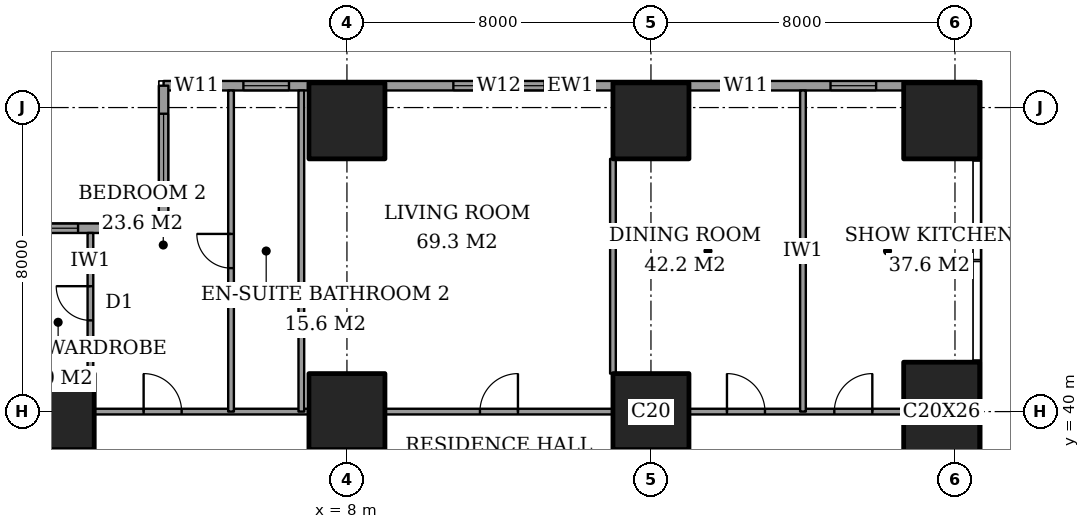
"""IFC4 building model, lengths in metres.
Left out: names, types, materials, properties, quantities, classifications, styles, units other than length and angle.
Written with IfcOpenShell. Run it as: python <this file> out.ifc"""

import sys

from ifc_helpers import new_model, si_unit, direction, frame, frame_2d, origin, origin_2d, place, context, subcontext, project, spatial, rectangle, extrude, element, fill, save


model = new_model("IFC4")
c1 = context("Model", 3, precision=1e-05, world=origin(), true_north=direction((0.0, 1.0)))
c2 = subcontext(c1, "Body", "Model", "MODEL_VIEW")
j1 = project(units=[si_unit("LENGTHUNIT", "METRE"), si_unit("PLANEANGLEUNIT", "RADIAN")], contexts=[c1])
p1 = place(None, origin())
s1 = spatial("IfcSite", under=j1, at=p1, CompositionType="ELEMENT")
p2 = place(p1, origin())
s2 = spatial("IfcBuilding", under=s1, at=p2, CompositionType="ELEMENT")
p3 = place(p2, frame((0.0, 0.0, 143.0)))
s3 = spatial("IfcBuildingStorey", under=s2, at=p3, CompositionType="ELEMENT", Elevation=143.0)
for number, where, z_axis, x_axis in (
    (1, (0.35, 40.0, 0.0), (0.0, 0.0, 1.0), (1.0, 0.0, 0.0)),
    (2, (8.0, 40.0, 0.0), (0.0, 0.0, 1.0), (1.0, 0.0, 0.0)),
    (3, (8.0, 47.65, 0.0), (0.0, 0.0, 1.0), (1.0, 0.0, 0.0)),
    (4, (16.0, 40.0, 0.0), (0.0, 0.0, 1.0), (1.0, 0.0, 0.0)),
    (5, (16.0, 47.65, 0.0), (0.0, 0.0, 1.0), (1.0, 0.0, 0.0)),
):
    element("IfcColumn", number, at=place(p3, frame(where, z_axis=z_axis, x_axis=x_axis)), inside=s3, PredefinedType="COLUMN", context=c2, shape_type="SweptSolid", body=[
        extrude(rectangle(XDim=2.0, YDim=2.0, at=origin_2d()), origin(), (0.0, 0.0, 1.0), 3.6),
    ])
p4 = place(p3, frame((23.65, 40.0, 0.0), z_axis=(0.0, 0.0, 1.0), x_axis=(1.0, 0.0, 0.0)))
e6 = element("IfcColumn", 6, at=p4, inside=s3, PredefinedType="COLUMN", context=c2, shape_type="SweptSolid", body=[
    extrude(rectangle(XDim=2.0, YDim=2.6, at=origin_2d()), origin(), (0.0, 0.0, 1.0), 3.6),
])
p5 = place(p3, frame((23.65, 47.65, 0.0), z_axis=(0.0, 0.0, 1.0), x_axis=(1.0, 0.0, 0.0)))
e7 = element("IfcColumn", 7, at=p5, inside=s3, PredefinedType="COLUMN", context=c2, shape_type="SweptSolid", body=[
    extrude(rectangle(XDim=2.0, YDim=2.0, at=origin_2d()), origin(), (0.0, 0.0, 1.0), 3.6),
])
p6 = place(p3, frame((24.575, 48.575, 0.0), z_axis=(0.0, 0.0, 1.0), x_axis=(-1.0, 0.0, 0.0)))
e8 = element("IfcWall", 8, at=p6, inside=s3, PredefinedType="SOLIDWALL", context=c2, shape_type="SweptSolid", body=[
    extrude(rectangle(XDim=21.4, YDim=0.25, at=frame_2d((10.7, 0.0))), origin(), (0.0, 0.0, 1.0), 3.6),
])
p7 = place(p6, frame((2.65, 0.0, 0.4)))
e9 = element("IfcOpeningElement", 9, at=p7, cuts=e8, PredefinedType="OPENING", context=c2, shape_type="SweptSolid", body=[
    extrude(rectangle(XDim=1.2, YDim=2.2, at=frame_2d((0.6, 1.1))), frame((0.0, 0.135, 0.0), z_axis=(0.0, -1.0, 0.0), x_axis=(1.0, 0.0, 0.0)), (0.0, 0.0, 1.0), 0.27),
])
p8 = place(p6, frame((5.475, 0.0, 0.4)))
e10 = element("IfcOpeningElement", 10, at=p8, cuts=e8, PredefinedType="OPENING", context=c2, shape_type="SweptSolid", body=[
    extrude(rectangle(XDim=1.2, YDim=2.2, at=frame_2d((0.6, 1.1))), frame((0.0, 0.135, 0.0), z_axis=(0.0, -1.0, 0.0), x_axis=(1.0, 0.0, 0.0)), (0.0, 0.0, 1.0), 0.27),
])
p9 = place(p6, frame((11.375, 0.0, 0.4)))
e11 = element("IfcOpeningElement", 11, at=p9, cuts=e8, PredefinedType="OPENING", context=c2, shape_type="SweptSolid", body=[
    extrude(rectangle(XDim=2.4, YDim=2.2, at=frame_2d((1.2, 1.1))), frame((0.0, 0.135, 0.0), z_axis=(0.0, -1.0, 0.0), x_axis=(1.0, 0.0, 0.0)), (0.0, 0.0, 1.0), 0.27),
])
p10 = place(p6, frame((18.1, 0.0, 0.4)))
e12 = element("IfcOpeningElement", 12, at=p10, cuts=e8, PredefinedType="OPENING", context=c2, shape_type="SweptSolid", body=[
    extrude(rectangle(XDim=1.2, YDim=2.2, at=frame_2d((0.6, 1.1))), frame((0.0, 0.135, 0.0), z_axis=(0.0, -1.0, 0.0), x_axis=(1.0, 0.0, 0.0)), (0.0, 0.0, 1.0), 0.27),
])
p11 = place(p6, frame((19.925, 0.0, 0.4)))
e13 = element("IfcOpeningElement", 13, at=p11, cuts=e8, PredefinedType="OPENING", context=c2, shape_type="SweptSolid", body=[
    extrude(rectangle(XDim=1.2, YDim=2.2, at=frame_2d((0.6, 1.1))), frame((0.0, 0.135, 0.0), z_axis=(0.0, -1.0, 0.0), x_axis=(1.0, 0.0, 0.0)), (0.0, 0.0, 1.0), 0.27),
])
p12 = place(p3, frame((3.175, 48.575, 0.0), z_axis=(0.0, 0.0, 1.0), x_axis=(0.0, -1.0, 0.0)))
e14 = element("IfcWall", 14, at=p12, inside=s3, PredefinedType="SOLIDWALL", context=c2, shape_type="SweptSolid", body=[
    extrude(rectangle(XDim=3.75, YDim=0.25, at=frame_2d((1.875, 0.0))), origin(), (0.0, 0.0, 1.0), 3.6),
])
p13 = place(p12, frame((0.738, 0.0, 0.4)))
e15 = element("IfcOpeningElement", 15, at=p13, cuts=e14, PredefinedType="OPENING", context=c2, shape_type="SweptSolid", body=[
    extrude(rectangle(XDim=2.4, YDim=2.2, at=frame_2d((1.2, 1.1))), frame((0.0, 0.135, 0.0), z_axis=(0.0, -1.0, 0.0), x_axis=(1.0, 0.0, 0.0)), (0.0, 0.0, 1.0), 0.27),
])
p14 = place(p3, frame((3.175, 44.825, 0.0), z_axis=(0.0, 0.0, 1.0), x_axis=(-1.0, 0.0, 0.0)))
e16 = element("IfcWall", 16, at=p14, inside=s3, PredefinedType="SOLIDWALL", context=c2, shape_type="SweptSolid", body=[
    extrude(rectangle(XDim=3.75, YDim=0.25, at=frame_2d((1.875, 0.0))), origin(), (0.0, 0.0, 1.0), 3.6),
])
p15 = place(p14, frame((0.363, 0.0, 0.4)))
e17 = element("IfcOpeningElement", 17, at=p15, cuts=e16, PredefinedType="OPENING", context=c2, shape_type="SweptSolid", body=[
    extrude(rectangle(XDim=1.2, YDim=2.2, at=frame_2d((0.6, 1.1))), frame((0.0, 0.135, 0.0), z_axis=(0.0, -1.0, 0.0), x_axis=(1.0, 0.0, 0.0)), (0.0, 0.0, 1.0), 0.27),
])
p16 = place(p14, frame((2.25, 0.0, 0.4)))
e18 = element("IfcOpeningElement", 18, at=p16, cuts=e16, PredefinedType="OPENING", context=c2, shape_type="SweptSolid", body=[
    extrude(rectangle(XDim=1.2, YDim=2.2, at=frame_2d((0.6, 1.1))), frame((0.0, 0.135, 0.0), z_axis=(0.0, -1.0, 0.0), x_axis=(1.0, 0.0, 0.0)), (0.0, 0.0, 1.0), 0.27),
])
p17 = place(p3, frame((1.35, 40.0, 0.0), z_axis=(0.0, 0.0, 1.0), x_axis=(1.0, 0.0, 0.0)))
e19 = element("IfcWall", 19, at=p17, inside=s3, PredefinedType="PARTITIONING", context=c2, shape_type="SweptSolid", body=[
    extrude(rectangle(XDim=5.65, YDim=0.15, at=frame_2d((2.825, 0.0))), origin(), (0.0, 0.0, 1.0), 3.35),
])
p18 = place(p17, frame((1.3, 0.0, 0.0)))
e20 = element("IfcOpeningElement", 20, at=p18, cuts=e19, PredefinedType="OPENING", context=c2, shape_type="SweptSolid", body=[
    extrude(rectangle(XDim=1.0, YDim=2.1, at=frame_2d((0.5, 1.05))), frame((0.0, 0.085, 0.0), z_axis=(0.0, -1.0, 0.0), x_axis=(1.0, 0.0, 0.0)), (0.0, 0.0, 1.0), 0.17),
])
p19 = place(p3, frame((9.0, 40.0, 0.0), z_axis=(0.0, 0.0, 1.0), x_axis=(1.0, 0.0, 0.0)))
e21 = element("IfcWall", 21, at=p19, inside=s3, PredefinedType="PARTITIONING", context=c2, shape_type="SweptSolid", body=[
    extrude(rectangle(XDim=6.0, YDim=0.15, at=frame_2d((3.0, 0.0))), origin(), (0.0, 0.0, 1.0), 3.35),
])
p20 = place(p19, frame((2.5, 0.0, 0.0)))
e22 = element("IfcOpeningElement", 22, at=p20, cuts=e21, PredefinedType="OPENING", context=c2, shape_type="SweptSolid", body=[
    extrude(rectangle(XDim=1.0, YDim=2.1, at=frame_2d((0.5, 1.05))), frame((0.0, 0.085, 0.0), z_axis=(0.0, -1.0, 0.0), x_axis=(1.0, 0.0, 0.0)), (0.0, 0.0, 1.0), 0.17),
])
p21 = place(p3, frame((17.0, 40.0, 0.0), z_axis=(0.0, 0.0, 1.0), x_axis=(1.0, 0.0, 0.0)))
e23 = element("IfcWall", 23, at=p21, inside=s3, PredefinedType="PARTITIONING", context=c2, shape_type="SweptSolid", body=[
    extrude(rectangle(XDim=5.65, YDim=0.15, at=frame_2d((2.825, 0.0))), origin(), (0.0, 0.0, 1.0), 3.35),
])
p22 = place(p21, frame((1.0, 0.0, 0.0)))
e24 = element("IfcOpeningElement", 24, at=p22, cuts=e23, PredefinedType="OPENING", context=c2, shape_type="SweptSolid", body=[
    extrude(rectangle(XDim=1.0, YDim=2.1, at=frame_2d((0.5, 1.05))), frame((0.0, 0.085, 0.0), z_axis=(0.0, -1.0, 0.0), x_axis=(1.0, 0.0, 0.0)), (0.0, 0.0, 1.0), 0.17),
])
p23 = place(p21, frame((3.825, 0.0, 0.0)))
e25 = element("IfcOpeningElement", 25, at=p23, cuts=e23, PredefinedType="OPENING", context=c2, shape_type="SweptSolid", body=[
    extrude(rectangle(XDim=1.0, YDim=2.1, at=frame_2d((0.5, 1.05))), frame((0.0, 0.085, 0.0), z_axis=(0.0, -1.0, 0.0), x_axis=(1.0, 0.0, 0.0)), (0.0, 0.0, 1.0), 0.17),
])
p24 = place(p3, frame((1.25, 41.0, 0.0), z_axis=(0.0, 0.0, 1.0), x_axis=(0.0, 1.0, 0.0)))
e26 = element("IfcWall", 26, at=p24, inside=s3, PredefinedType="PARTITIONING", context=c2, shape_type="SweptSolid", body=[
    extrude(rectangle(XDim=3.7, YDim=0.15, at=frame_2d((1.85, 0.0))), origin(), (0.0, 0.0, 1.0), 3.35),
])
p25 = place(p24, frame((1.4, 0.0, 0.0)))
e27 = element("IfcOpeningElement", 27, at=p25, cuts=e26, PredefinedType="OPENING", context=c2, shape_type="SweptSolid", body=[
    extrude(rectangle(XDim=0.9, YDim=2.1, at=frame_2d((0.45, 1.05))), frame((0.0, 0.085, 0.0), z_axis=(0.0, -1.0, 0.0), x_axis=(1.0, 0.0, 0.0)), (0.0, 0.0, 1.0), 0.17),
])
p26 = place(p3, frame((4.95, 40.0, 0.0), z_axis=(0.0, 0.0, 1.0), x_axis=(0.0, 1.0, 0.0)))
e28 = element("IfcWall", 28, at=p26, inside=s3, PredefinedType="PARTITIONING", context=c2, shape_type="SweptSolid", body=[
    extrude(rectangle(XDim=8.45, YDim=0.15, at=frame_2d((4.225, 0.0))), origin(), (0.0, 0.0, 1.0), 3.35),
])
p27 = place(p26, frame((3.775, 0.0, 0.0)))
e29 = element("IfcOpeningElement", 29, at=p27, cuts=e28, PredefinedType="OPENING", context=c2, shape_type="SweptSolid", body=[
    extrude(rectangle(XDim=0.9, YDim=2.1, at=frame_2d((0.45, 1.05))), frame((0.0, 0.085, 0.0), z_axis=(0.0, -1.0, 0.0), x_axis=(1.0, 0.0, 0.0)), (0.0, 0.0, 1.0), 0.17),
])
p28 = place(p3, frame((6.8, 40.0, 0.0), z_axis=(0.0, 0.0, 1.0), x_axis=(0.0, 1.0, 0.0)))
e30 = element("IfcWall", 30, at=p28, inside=s3, PredefinedType="PARTITIONING", context=c2, shape_type="SweptSolid", body=[
    extrude(rectangle(XDim=8.45, YDim=0.15, at=frame_2d((4.225, 0.0))), origin(), (0.0, 0.0, 1.0), 3.35),
])
p29 = place(p3, frame((15.0, 41.0, 0.0), z_axis=(0.0, 0.0, 1.0), x_axis=(0.0, 1.0, 0.0)))
e31 = element("IfcWall", 31, at=p29, inside=s3, PredefinedType="PARTITIONING", context=c2, shape_type="SweptSolid", body=[
    extrude(rectangle(XDim=5.65, YDim=0.15, at=frame_2d((2.825, 0.0))), origin(), (0.0, 0.0, 1.0), 3.35),
])
p30 = place(p3, frame((20.0, 40.0, 0.0), z_axis=(0.0, 0.0, 1.0), x_axis=(0.0, 1.0, 0.0)))
e32 = element("IfcWall", 32, at=p30, inside=s3, PredefinedType="PARTITIONING", context=c2, shape_type="SweptSolid", body=[
    extrude(rectangle(XDim=8.45, YDim=0.15, at=frame_2d((4.225, 0.0))), origin(), (0.0, 0.0, 1.0), 3.35),
])
p31 = place(p7, origin())
e33 = element("IfcWindow", 33, at=p31, inside=s3, PartitioningType="SINGLE_PANEL", PredefinedType="WINDOW", context=c2, shape_type="SweptSolid", body=[
    extrude(rectangle(XDim=1.2, YDim=2.2, at=frame_2d((0.6, 1.1))), frame((0.0, 0.03, 0.0), z_axis=(0.0, -1.0, 0.0), x_axis=(1.0, 0.0, 0.0)), (0.0, 0.0, 1.0), 0.06),
])
fill(e9, e33)
p32 = place(p8, origin())
e34 = element("IfcWindow", 34, at=p32, inside=s3, PartitioningType="SINGLE_PANEL", PredefinedType="WINDOW", context=c2, shape_type="SweptSolid", body=[
    extrude(rectangle(XDim=1.2, YDim=2.2, at=frame_2d((0.6, 1.1))), frame((0.0, 0.03, 0.0), z_axis=(0.0, -1.0, 0.0), x_axis=(1.0, 0.0, 0.0)), (0.0, 0.0, 1.0), 0.06),
])
fill(e10, e34)
p33 = place(p9, origin())
e35 = element("IfcWindow", 35, at=p33, inside=s3, PartitioningType="SINGLE_PANEL", PredefinedType="WINDOW", context=c2, shape_type="SweptSolid", body=[
    extrude(rectangle(XDim=2.4, YDim=2.2, at=frame_2d((1.2, 1.1))), frame((0.0, 0.03, 0.0), z_axis=(0.0, -1.0, 0.0), x_axis=(1.0, 0.0, 0.0)), (0.0, 0.0, 1.0), 0.06),
])
fill(e11, e35)
p34 = place(p10, origin())
e36 = element("IfcWindow", 36, at=p34, inside=s3, PartitioningType="SINGLE_PANEL", PredefinedType="WINDOW", context=c2, shape_type="SweptSolid", body=[
    extrude(rectangle(XDim=1.2, YDim=2.2, at=frame_2d((0.6, 1.1))), frame((0.0, 0.03, 0.0), z_axis=(0.0, -1.0, 0.0), x_axis=(1.0, 0.0, 0.0)), (0.0, 0.0, 1.0), 0.06),
])
fill(e12, e36)
p35 = place(p11, origin())
e37 = element("IfcWindow", 37, at=p35, inside=s3, PartitioningType="SINGLE_PANEL", PredefinedType="WINDOW", context=c2, shape_type="SweptSolid", body=[
    extrude(rectangle(XDim=1.2, YDim=2.2, at=frame_2d((0.6, 1.1))), frame((0.0, 0.03, 0.0), z_axis=(0.0, -1.0, 0.0), x_axis=(1.0, 0.0, 0.0)), (0.0, 0.0, 1.0), 0.06),
])
fill(e13, e37)
p36 = place(p13, origin())
e38 = element("IfcWindow", 38, at=p36, inside=s3, PartitioningType="SINGLE_PANEL", PredefinedType="WINDOW", context=c2, shape_type="SweptSolid", body=[
    extrude(rectangle(XDim=2.4, YDim=2.2, at=frame_2d((1.2, 1.1))), frame((0.0, 0.03, 0.0), z_axis=(0.0, -1.0, 0.0), x_axis=(1.0, 0.0, 0.0)), (0.0, 0.0, 1.0), 0.06),
])
fill(e15, e38)
p37 = place(p15, origin())
e39 = element("IfcWindow", 39, at=p37, inside=s3, PartitioningType="SINGLE_PANEL", PredefinedType="WINDOW", context=c2, shape_type="SweptSolid", body=[
    extrude(rectangle(XDim=1.2, YDim=2.2, at=frame_2d((0.6, 1.1))), frame((0.0, 0.03, 0.0), z_axis=(0.0, -1.0, 0.0), x_axis=(1.0, 0.0, 0.0)), (0.0, 0.0, 1.0), 0.06),
])
fill(e17, e39)
p38 = place(p16, origin())
e40 = element("IfcWindow", 40, at=p38, inside=s3, PartitioningType="SINGLE_PANEL", PredefinedType="WINDOW", context=c2, shape_type="SweptSolid", body=[
    extrude(rectangle(XDim=1.2, YDim=2.2, at=frame_2d((0.6, 1.1))), frame((0.0, 0.03, 0.0), z_axis=(0.0, -1.0, 0.0), x_axis=(1.0, 0.0, 0.0)), (0.0, 0.0, 1.0), 0.06),
])
fill(e18, e40)
p39 = place(p25, origin())
e41 = element("IfcDoor", 41, at=p39, inside=s3, OperationType="SINGLE_SWING_LEFT", PredefinedType="DOOR", context=c2, shape_type="SweptSolid", body=[
    extrude(rectangle(XDim=0.9, YDim=2.1, at=frame_2d((0.45, 1.05))), frame((0.0, 0.025, 0.0), z_axis=(0.0, -1.0, 0.0), x_axis=(1.0, 0.0, 0.0)), (0.0, 0.0, 1.0), 0.05),
])
fill(e27, e41)
p40 = place(p18, origin())
e42 = element("IfcDoor", 42, at=p40, inside=s3, OperationType="SINGLE_SWING_RIGHT", PredefinedType="DOOR", context=c2, shape_type="SweptSolid", body=[
    extrude(rectangle(XDim=1.0, YDim=2.1, at=frame_2d((0.5, 1.05))), frame((0.0, 0.025, 0.0), z_axis=(0.0, -1.0, 0.0), x_axis=(1.0, 0.0, 0.0)), (0.0, 0.0, 1.0), 0.05),
])
fill(e20, e42)
p41 = place(p27, origin())
e43 = element("IfcDoor", 43, at=p41, inside=s3, OperationType="SINGLE_SWING_LEFT", PredefinedType="DOOR", context=c2, shape_type="SweptSolid", body=[
    extrude(rectangle(XDim=0.9, YDim=2.1, at=frame_2d((0.45, 1.05))), frame((0.0, 0.025, 0.0), z_axis=(0.0, -1.0, 0.0), x_axis=(1.0, 0.0, 0.0)), (0.0, 0.0, 1.0), 0.05),
])
fill(e29, e43)
p42 = place(p20, origin())
e44 = element("IfcDoor", 44, at=p42, inside=s3, OperationType="SINGLE_SWING_LEFT", PredefinedType="DOOR", context=c2, shape_type="SweptSolid", body=[
    extrude(rectangle(XDim=1.0, YDim=2.1, at=frame_2d((0.5, 1.05))), frame((0.0, 0.025, 0.0), z_axis=(0.0, -1.0, 0.0), x_axis=(1.0, 0.0, 0.0)), (0.0, 0.0, 1.0), 0.05),
])
fill(e22, e44)
p43 = place(p22, origin())
e45 = element("IfcDoor", 45, at=p43, inside=s3, OperationType="SINGLE_SWING_RIGHT", PredefinedType="DOOR", context=c2, shape_type="SweptSolid", body=[
    extrude(rectangle(XDim=1.0, YDim=2.1, at=frame_2d((0.5, 1.05))), frame((0.0, 0.025, 0.0), z_axis=(0.0, -1.0, 0.0), x_axis=(1.0, 0.0, 0.0)), (0.0, 0.0, 1.0), 0.05),
])
fill(e24, e45)
p44 = place(p23, origin())
e46 = element("IfcDoor", 46, at=p44, inside=s3, OperationType="SINGLE_SWING_LEFT", PredefinedType="DOOR", context=c2, shape_type="SweptSolid", body=[
    extrude(rectangle(XDim=1.0, YDim=2.1, at=frame_2d((0.5, 1.05))), frame((0.0, 0.025, 0.0), z_axis=(0.0, -1.0, 0.0), x_axis=(1.0, 0.0, 0.0)), (0.0, 0.0, 1.0), 0.05),
])
fill(e25, e46)
save(model, sys.argv[1])
